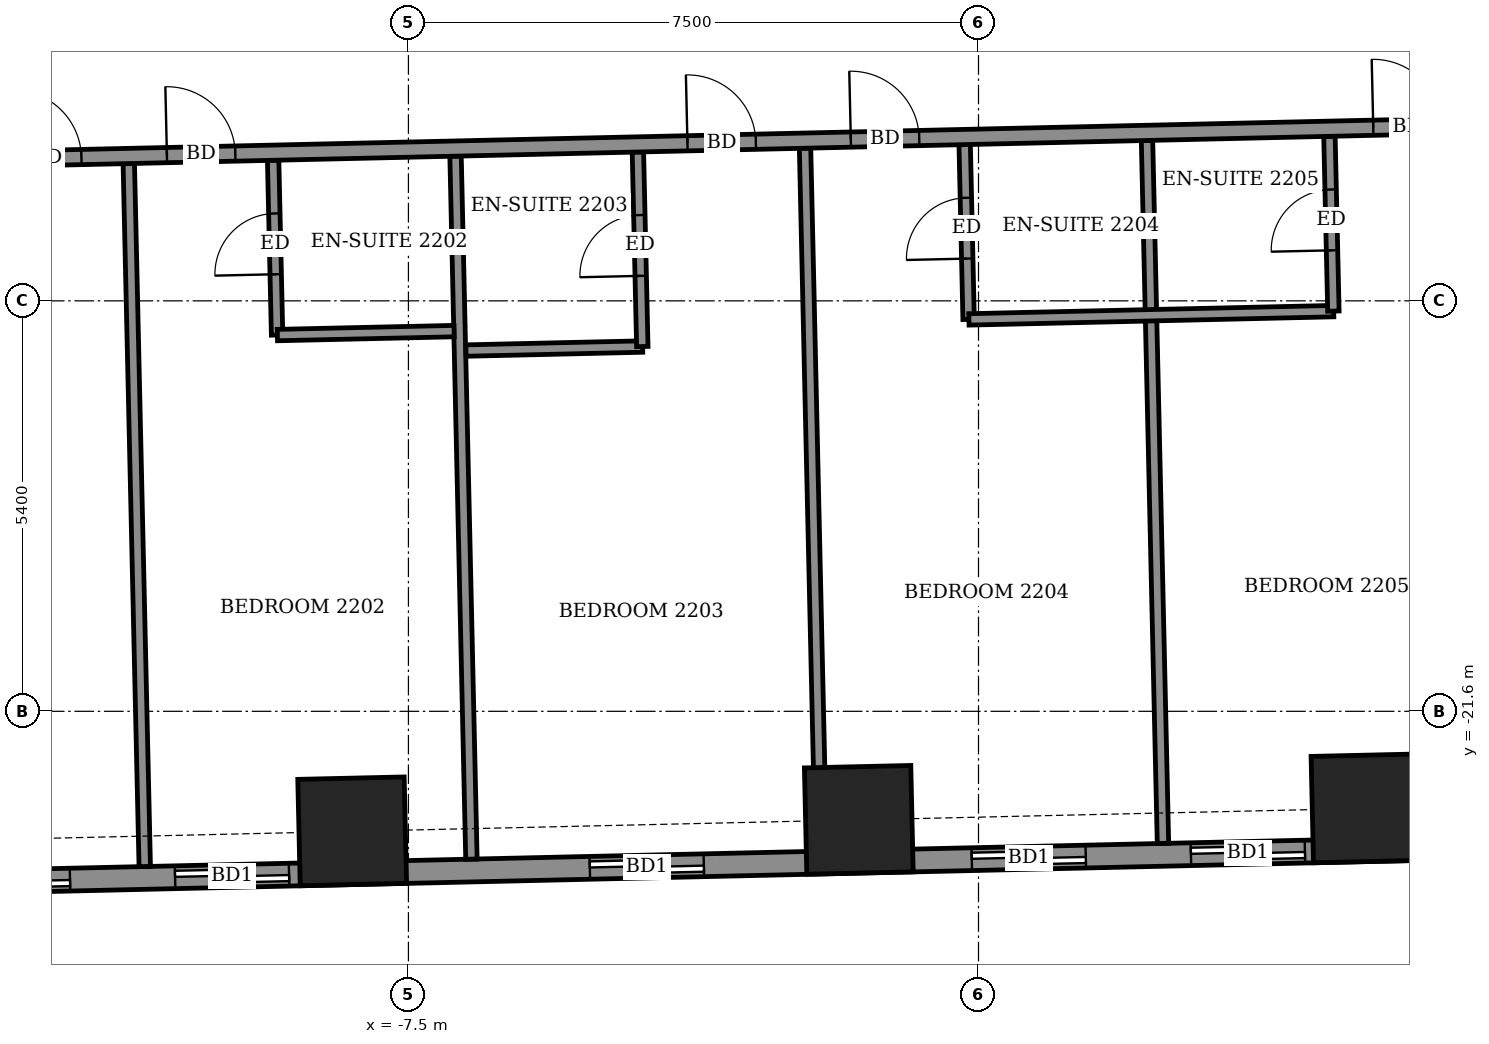
"""IFC4 building model, lengths in metres.
Left out: names, types, materials, properties, quantities, classifications, styles, units other than length and angle.
Written with IfcOpenShell. Run it as: python <this file> out.ifc"""

import sys

from ifc_helpers import new_model, si_unit, direction, frame, frame_2d, origin, origin_2d, place, context, subcontext, project, spatial, rectangle, extrude, element, fill, save


model = new_model("IFC4")
c1 = context("Model", 3, precision=1e-05, world=origin(), true_north=direction((0.0, 1.0)))
c2 = subcontext(c1, "Body", "Model", "MODEL_VIEW")
j1 = project(units=[si_unit("LENGTHUNIT", "METRE"), si_unit("PLANEANGLEUNIT", "RADIAN")], contexts=[c1])
p1 = place(None, origin())
s1 = spatial("IfcSite", under=j1, at=p1, CompositionType="ELEMENT")
p2 = place(p1, origin())
s2 = spatial("IfcBuilding", under=s1, at=p2, CompositionType="ELEMENT")
p3 = place(p2, frame((0.0, 0.0, 90.1)))
s3 = spatial("IfcBuildingStorey", under=s2, at=p3, CompositionType="ELEMENT", Elevation=90.1)
for number, where, z_axis, x_axis in (
    (1, (-8.24, -23.179, -0.55), (0.0, 0.0, 1.0), (1.0, 0.023, 0.0)),
    (2, (-1.575, -23.028, -0.55), (0.0, 0.0, 1.0), (1.0, 0.023, 0.0)),
    (3, (5.091, -22.877, -0.55), (0.0, 0.0, 1.0), (1.0, 0.023, 0.0)),
):
    element("IfcColumn", number, at=place(p3, frame(where, z_axis=z_axis, x_axis=x_axis)), inside=s3, PredefinedType="COLUMN", context=c2, shape_type="SweptSolid", body=[
        extrude(rectangle(XDim=1.4, YDim=1.4, at=origin_2d()), origin(), (0.0, 0.0, 1.0), 3.6),
    ])
p4 = place(p3, frame((-21.409, -24.029, 0.0), z_axis=(0.0, 0.0, 1.0), x_axis=(0.999742634032, 0.022686244721, 0.0)))
e4 = element("IfcWall", 4, at=p4, inside=s3, PredefinedType="SOLIDWALL", context=c2, shape_type="SweptSolid", body=[
    extrude(rectangle(XDim=46.372, YDim=0.3, at=frame_2d((23.186, 0.0))), origin(), (0.0, 0.0, 1.0), 3.05),
])
p5 = place(p4, frame((2.686, 0.0, 0.0)))
e5 = element("IfcOpeningElement", 5, at=p5, cuts=e4, PredefinedType="OPENING", context=c2, shape_type="SweptSolid", body=[
    extrude(rectangle(XDim=1.5, YDim=2.4, at=frame_2d((0.75, 1.2))), frame((0.0, 0.16, 0.0), z_axis=(0.0, -1.0, 0.0), x_axis=(1.0, 0.0, 0.0)), (0.0, 0.0, 1.0), 0.32),
])
p6 = place(p4, frame((7.959, 0.0, 0.0)))
e6 = element("IfcOpeningElement", 6, at=p6, cuts=e4, PredefinedType="OPENING", context=c2, shape_type="SweptSolid", body=[
    extrude(rectangle(XDim=1.5, YDim=2.4, at=frame_2d((0.75, 1.2))), frame((0.0, 0.16, 0.0), z_axis=(0.0, -1.0, 0.0), x_axis=(1.0, 0.0, 0.0)), (0.0, 0.0, 1.0), 0.32),
])
p7 = place(p4, frame((10.842, 0.0, 0.0)))
e7 = element("IfcOpeningElement", 7, at=p7, cuts=e4, PredefinedType="OPENING", context=c2, shape_type="SweptSolid", body=[
    extrude(rectangle(XDim=1.5, YDim=2.4, at=frame_2d((0.75, 1.2))), frame((0.0, 0.16, 0.0), z_axis=(0.0, -1.0, 0.0), x_axis=(1.0, 0.0, 0.0)), (0.0, 0.0, 1.0), 0.32),
])
p8 = place(p4, frame((16.3, 0.0, 0.0)))
e8 = element("IfcOpeningElement", 8, at=p8, cuts=e4, PredefinedType="OPENING", context=c2, shape_type="SweptSolid", body=[
    extrude(rectangle(XDim=1.5, YDim=2.4, at=frame_2d((0.75, 1.2))), frame((0.0, 0.16, 0.0), z_axis=(0.0, -1.0, 0.0), x_axis=(1.0, 0.0, 0.0)), (0.0, 0.0, 1.0), 0.32),
])
p9 = place(p4, frame((21.326, 0.0, 0.0)))
e9 = element("IfcOpeningElement", 9, at=p9, cuts=e4, PredefinedType="OPENING", context=c2, shape_type="SweptSolid", body=[
    extrude(rectangle(XDim=1.5, YDim=2.4, at=frame_2d((0.75, 1.2))), frame((0.0, 0.16, 0.0), z_axis=(0.0, -1.0, 0.0), x_axis=(1.0, 0.0, 0.0)), (0.0, 0.0, 1.0), 0.32),
])
p10 = place(p4, frame((24.21, 0.0, 0.0)))
e10 = element("IfcOpeningElement", 10, at=p10, cuts=e4, PredefinedType="OPENING", context=c2, shape_type="SweptSolid", body=[
    extrude(rectangle(XDim=1.5, YDim=2.4, at=frame_2d((0.75, 1.2))), frame((0.0, 0.16, 0.0), z_axis=(0.0, -1.0, 0.0), x_axis=(1.0, 0.0, 0.0)), (0.0, 0.0, 1.0), 0.32),
])
p11 = place(p4, frame((29.769, 0.0, 0.0)))
e11 = element("IfcOpeningElement", 11, at=p11, cuts=e4, PredefinedType="OPENING", context=c2, shape_type="SweptSolid", body=[
    extrude(rectangle(XDim=1.5, YDim=2.4, at=frame_2d((0.75, 1.2))), frame((0.0, 0.16, 0.0), z_axis=(0.0, -1.0, 0.0), x_axis=(1.0, 0.0, 0.0)), (0.0, 0.0, 1.0), 0.32),
])
p12 = place(p4, frame((34.819, 0.0, 0.0)))
e12 = element("IfcOpeningElement", 12, at=p12, cuts=e4, PredefinedType="OPENING", context=c2, shape_type="SweptSolid", body=[
    extrude(rectangle(XDim=1.5, YDim=2.4, at=frame_2d((0.75, 1.2))), frame((0.0, 0.16, 0.0), z_axis=(0.0, -1.0, 0.0), x_axis=(1.0, 0.0, 0.0)), (0.0, 0.0, 1.0), 0.32),
])
p13 = place(p4, frame((37.852, 0.0, 0.0)))
e13 = element("IfcOpeningElement", 13, at=p13, cuts=e4, PredefinedType="OPENING", context=c2, shape_type="SweptSolid", body=[
    extrude(rectangle(XDim=1.2, YDim=2.4, at=frame_2d((0.6, 1.2))), frame((0.0, 0.16, 0.0), z_axis=(0.0, -1.0, 0.0), x_axis=(1.0, 0.0, 0.0)), (0.0, 0.0, 1.0), 0.32),
])
p14 = place(p4, frame((42.373, 0.0, 0.9)))
e14 = element("IfcOpeningElement", 14, at=p14, cuts=e4, PredefinedType="OPENING", context=c2, shape_type="SweptSolid", body=[
    extrude(rectangle(XDim=2.4, YDim=1.5, at=frame_2d((1.2, 0.75))), frame((0.0, 0.16, 0.0), z_axis=(0.0, -1.0, 0.0), x_axis=(1.0, 0.0, 0.0)), (0.0, 0.0, 1.0), 0.32),
])
p15 = place(p3, frame((-10.969, -23.642, 0.0), z_axis=(0.0, 0.0, 1.0), x_axis=(-0.022697424684, 0.999742380272, 0.0)))
e15 = element("IfcWall", 15, at=p15, inside=s3, PredefinedType="PARTITIONING", context=c2, shape_type="SweptSolid", body=[
    extrude(rectangle(XDim=9.25, YDim=0.15, at=frame_2d((4.625, 0.0))), origin(), (0.0, 0.0, 1.0), 2.55),
])
p16 = place(p3, frame((-6.671, -23.545, 0.0), z_axis=(0.0, 0.0, 1.0), x_axis=(-0.022592505393, 0.999744756775, 0.0)))
e16 = element("IfcWall", 16, at=p16, inside=s3, PredefinedType="PARTITIONING", context=c2, shape_type="SweptSolid", body=[
    extrude(rectangle(XDim=9.25, YDim=0.15, at=frame_2d((4.625, 0.0))), origin(), (0.0, 0.0, 1.0), 2.55),
])
p17 = place(p3, frame((-2.072, -23.44, 0.0), z_axis=(0.0, 0.0, 1.0), x_axis=(-0.022697424684, 0.999742380272, 0.0)))
e17 = element("IfcWall", 17, at=p17, inside=s3, PredefinedType="PARTITIONING", context=c2, shape_type="SweptSolid", body=[
    extrude(rectangle(XDim=9.25, YDim=0.15, at=frame_2d((4.625, 0.0))), origin(), (0.0, 0.0, 1.0), 3.05),
])
p18 = place(p3, frame((2.427, -23.338, 0.0), z_axis=(0.0, 0.0, 1.0), x_axis=(-0.022698023584, 0.999742366675, 0.0)))
e18 = element("IfcWall", 18, at=p18, inside=s3, PredefinedType="PARTITIONING", context=c2, shape_type="SweptSolid", body=[
    extrude(rectangle(XDim=9.25, YDim=0.15, at=frame_2d((4.625, 0.0))), origin(), (0.0, 0.0, 1.0), 2.55),
])
p19 = place(p3, frame((-6.743, -16.854, 0.0), z_axis=(0.0, 0.0, 1.0), x_axis=(0.999740260747, 0.02279059109, 0.0)))
e19 = element("IfcWall", 19, at=p19, inside=s3, PredefinedType="PARTITIONING", context=c2, shape_type="SweptSolid", body=[
    extrude(rectangle(XDim=2.324, YDim=0.15, at=frame_2d((1.162, 0.0))), origin(), (0.0, 0.0, 1.0), 3.05),
])
p20 = place(p3, frame((-4.423, -16.801, 0.0), z_axis=(0.0, 0.0, 1.0), x_axis=(-0.022604411713, 0.999744487642, 0.0)))
e20 = element("IfcWall", 20, at=p20, inside=s3, PredefinedType="PARTITIONING", context=c2, shape_type="SweptSolid", body=[
    extrude(rectangle(XDim=2.56, YDim=0.15, at=frame_2d((1.28, 0.0))), origin(), (0.0, 0.0, 1.0), 3.05),
])
p21 = place(p20, frame((0.93, 0.0, 0.0)))
e21 = element("IfcOpeningElement", 21, at=p21, cuts=e20, PredefinedType="OPENING", context=c2, shape_type="SweptSolid", body=[
    extrude(rectangle(XDim=0.8, YDim=2.1, at=frame_2d((0.4, 1.05))), frame((0.0, 0.085, 0.0), z_axis=(0.0, -1.0, 0.0), x_axis=(1.0, 0.0, 0.0)), (0.0, 0.0, 1.0), 0.17),
])
p22 = place(p3, frame((-9.228, -16.65, 0.0), z_axis=(0.0, 0.0, 1.0), x_axis=(-0.022615284993, 0.999744241736, 0.0)))
e22 = element("IfcWall", 22, at=p22, inside=s3, PredefinedType="PARTITIONING", context=c2, shape_type="SweptSolid", body=[
    extrude(rectangle(XDim=2.299, YDim=0.15, at=frame_2d((1.15, 0.0))), origin(), (0.0, 0.0, 1.0), 3.05),
])
p23 = place(p22, frame((0.8, 0.0, 0.0)))
e23 = element("IfcOpeningElement", 23, at=p23, cuts=e22, PredefinedType="OPENING", context=c2, shape_type="SweptSolid", body=[
    extrude(rectangle(XDim=0.8, YDim=2.1, at=frame_2d((0.4, 1.05))), frame((0.0, 0.085, 0.0), z_axis=(0.0, -1.0, 0.0), x_axis=(1.0, 0.0, 0.0)), (0.0, 0.0, 1.0), 0.17),
])
p24 = place(p3, frame((-9.224, -16.65, 0.0), z_axis=(0.0, 0.0, 1.0), x_axis=(0.999750007167, 0.022358961731, 0.0)))
e24 = element("IfcWall", 24, at=p24, inside=s3, PredefinedType="PARTITIONING", context=c2, shape_type="SweptSolid", body=[
    extrude(rectangle(XDim=2.326, YDim=0.15, at=frame_2d((1.163, 0.0))), origin(), (0.0, 0.0, 1.0), 3.05),
])
p25 = place(p3, frame((-0.13, -16.444, 0.0), z_axis=(0.0, 0.0, 1.0), x_axis=(-0.022603288534, 0.999744513037, 0.0)))
e25 = element("IfcWall", 25, at=p25, inside=s3, PredefinedType="PARTITIONING", context=c2, shape_type="SweptSolid", body=[
    extrude(rectangle(XDim=2.301, YDim=0.15, at=frame_2d((1.15, 0.0))), origin(), (0.0, 0.0, 1.0), 3.05),
])
p26 = place(p25, frame((0.8, 0.0, 0.0)))
e26 = element("IfcOpeningElement", 26, at=p26, cuts=e25, PredefinedType="OPENING", context=c2, shape_type="SweptSolid", body=[
    extrude(rectangle(XDim=0.8, YDim=2.1, at=frame_2d((0.4, 1.05))), frame((0.0, 0.085, 0.0), z_axis=(0.0, -1.0, 0.0), x_axis=(1.0, 0.0, 0.0)), (0.0, 0.0, 1.0), 0.17),
])
p27 = place(p3, frame((-0.126, -16.444, 0.0), z_axis=(0.0, 0.0, 1.0), x_axis=(0.99974154664, 0.022734113616, 0.0)))
e27 = element("IfcWall", 27, at=p27, inside=s3, PredefinedType="PARTITIONING", context=c2, shape_type="SweptSolid", body=[
    extrude(rectangle(XDim=4.8, YDim=0.15, at=frame_2d((2.4, 0.0))), origin(), (0.0, 0.0, 1.0), 3.05),
])
p28 = place(p3, frame((4.669, -16.335, 0.0), z_axis=(0.0, 0.0, 1.0), x_axis=(-0.022612884682, 0.999744296031, 0.0)))
e28 = element("IfcWall", 28, at=p28, inside=s3, PredefinedType="PARTITIONING", context=c2, shape_type="SweptSolid", body=[
    extrude(rectangle(XDim=2.3, YDim=0.15, at=frame_2d((1.15, 0.0))), origin(), (0.0, 0.0, 1.0), 3.05),
])
p29 = place(p28, frame((0.8, 0.0, 0.0)))
e29 = element("IfcOpeningElement", 29, at=p29, cuts=e28, PredefinedType="OPENING", context=c2, shape_type="SweptSolid", body=[
    extrude(rectangle(XDim=0.8, YDim=2.1, at=frame_2d((0.4, 1.05))), frame((0.0, 0.085, 0.0), z_axis=(0.0, -1.0, 0.0), x_axis=(1.0, 0.0, 0.0)), (0.0, 0.0, 1.0), 0.17),
])
p30 = place(p3, frame((-24.274, -14.591, 0.0), z_axis=(0.0, 0.0, 1.0), x_axis=(0.999742718753, 0.022682510909, 0.0)))
e30 = element("IfcWall", 30, at=p30, inside=s3, PredefinedType="PARTITIONING", context=c2, shape_type="SweptSolid", body=[
    extrude(rectangle(XDim=52.471, YDim=0.2, at=frame_2d((26.236, 0.0))), origin(), (0.0, 0.0, 1.0), 3.05),
])
p31 = place(p30, frame((1.525, 0.0, 0.0)))
e31 = element("IfcOpeningElement", 31, at=p31, cuts=e30, PredefinedType="OPENING", context=c2, shape_type="SweptSolid", body=[
    extrude(rectangle(XDim=1.0, YDim=2.1, at=frame_2d((0.5, 1.05))), frame((0.0, 0.11, 0.0), z_axis=(0.0, -1.0, 0.0), x_axis=(1.0, 0.0, 0.0)), (0.0, 0.0, 1.0), 0.22),
])
p32 = place(p30, frame((6.9, 0.0, 0.0)))
e32 = element("IfcOpeningElement", 32, at=p32, cuts=e30, PredefinedType="OPENING", context=c2, shape_type="SweptSolid", body=[
    extrude(rectangle(XDim=0.9, YDim=2.1, at=frame_2d((0.45, 1.05))), frame((0.0, 0.11, 0.0), z_axis=(0.0, -1.0, 0.0), x_axis=(1.0, 0.0, 0.0)), (0.0, 0.0, 1.0), 0.22),
])
p33 = place(p30, frame((11.575, 0.0, 0.0)))
e33 = element("IfcOpeningElement", 33, at=p33, cuts=e30, PredefinedType="OPENING", context=c2, shape_type="SweptSolid", body=[
    extrude(rectangle(XDim=0.9, YDim=2.1, at=frame_2d((0.45, 1.05))), frame((0.0, 0.11, 0.0), z_axis=(0.0, -1.0, 0.0), x_axis=(1.0, 0.0, 0.0)), (0.0, 0.0, 1.0), 0.22),
])
p34 = place(p30, frame((13.6, 0.0, 0.0)))
e34 = element("IfcOpeningElement", 34, at=p34, cuts=e30, PredefinedType="OPENING", context=c2, shape_type="SweptSolid", body=[
    extrude(rectangle(XDim=0.9, YDim=2.1, at=frame_2d((0.45, 1.05))), frame((0.0, 0.11, 0.0), z_axis=(0.0, -1.0, 0.0), x_axis=(1.0, 0.0, 0.0)), (0.0, 0.0, 1.0), 0.22),
])
p35 = place(p30, frame((20.45, 0.0, 0.0)))
e35 = element("IfcOpeningElement", 35, at=p35, cuts=e30, PredefinedType="OPENING", context=c2, shape_type="SweptSolid", body=[
    extrude(rectangle(XDim=0.9, YDim=2.1, at=frame_2d((0.45, 1.05))), frame((0.0, 0.11, 0.0), z_axis=(0.0, -1.0, 0.0), x_axis=(1.0, 0.0, 0.0)), (0.0, 0.0, 1.0), 0.22),
])
p36 = place(p30, frame((22.6, 0.0, 0.0)))
e36 = element("IfcOpeningElement", 36, at=p36, cuts=e30, PredefinedType="OPENING", context=c2, shape_type="SweptSolid", body=[
    extrude(rectangle(XDim=0.9, YDim=2.1, at=frame_2d((0.45, 1.05))), frame((0.0, 0.11, 0.0), z_axis=(0.0, -1.0, 0.0), x_axis=(1.0, 0.0, 0.0)), (0.0, 0.0, 1.0), 0.22),
])
p37 = place(p30, frame((29.475, 0.0, 0.0)))
e37 = element("IfcOpeningElement", 37, at=p37, cuts=e30, PredefinedType="OPENING", context=c2, shape_type="SweptSolid", body=[
    extrude(rectangle(XDim=0.9, YDim=2.1, at=frame_2d((0.45, 1.05))), frame((0.0, 0.11, 0.0), z_axis=(0.0, -1.0, 0.0), x_axis=(1.0, 0.0, 0.0)), (0.0, 0.0, 1.0), 0.22),
])
p38 = place(p30, frame((31.675, 0.0, 0.0)))
e38 = element("IfcOpeningElement", 38, at=p38, cuts=e30, PredefinedType="OPENING", context=c2, shape_type="SweptSolid", body=[
    extrude(rectangle(XDim=0.9, YDim=2.1, at=frame_2d((0.45, 1.05))), frame((0.0, 0.11, 0.0), z_axis=(0.0, -1.0, 0.0), x_axis=(1.0, 0.0, 0.0)), (0.0, 0.0, 1.0), 0.22),
])
p39 = place(p30, frame((38.675, 0.0, 0.0)))
e39 = element("IfcOpeningElement", 39, at=p39, cuts=e30, PredefinedType="OPENING", context=c2, shape_type="SweptSolid", body=[
    extrude(rectangle(XDim=0.9, YDim=2.1, at=frame_2d((0.45, 1.05))), frame((0.0, 0.11, 0.0), z_axis=(0.0, -1.0, 0.0), x_axis=(1.0, 0.0, 0.0)), (0.0, 0.0, 1.0), 0.22),
])
p40 = place(p30, frame((40.675, 0.0, 0.0)))
e40 = element("IfcOpeningElement", 40, at=p40, cuts=e30, PredefinedType="OPENING", context=c2, shape_type="SweptSolid", body=[
    extrude(rectangle(XDim=0.9, YDim=2.1, at=frame_2d((0.45, 1.05))), frame((0.0, 0.11, 0.0), z_axis=(0.0, -1.0, 0.0), x_axis=(1.0, 0.0, 0.0)), (0.0, 0.0, 1.0), 0.22),
])
p41 = place(p30, frame((50.436, 0.0, 0.0)))
e41 = element("IfcOpeningElement", 41, at=p41, cuts=e30, PredefinedType="OPENING", context=c2, shape_type="SweptSolid", body=[
    extrude(rectangle(XDim=1.0, YDim=2.1, at=frame_2d((0.5, 1.05))), frame((0.0, 0.11, 0.0), z_axis=(0.0, -1.0, 0.0), x_axis=(1.0, 0.0, 0.0)), (0.0, 0.0, 1.0), 0.22),
])
p42 = place(p30, frame((45.45, 0.0, 0.0)))
e42 = element("IfcOpeningElement", 42, at=p42, cuts=e30, PredefinedType="OPENING", context=c2, shape_type="SweptSolid", body=[
    extrude(rectangle(XDim=0.9, YDim=2.1, at=frame_2d((0.45, 1.05))), frame((0.0, 0.11, 0.0), z_axis=(0.0, -1.0, 0.0), x_axis=(1.0, 0.0, 0.0)), (0.0, 0.0, 1.0), 0.22),
])
p43 = place(p6, origin())
e43 = element("IfcDoor", 43, at=p43, inside=s3, OperationType="SLIDING_TO_LEFT", PredefinedType="DOOR", context=c2, shape_type="SweptSolid", body=[
    extrude(rectangle(XDim=1.5, YDim=2.4, at=frame_2d((0.75, 1.2))), frame((0.0, 0.025, 0.0), z_axis=(0.0, -1.0, 0.0), x_axis=(1.0, 0.0, 0.0)), (0.0, 0.0, 1.0), 0.05),
])
fill(e6, e43)
p44 = place(p7, origin())
e44 = element("IfcDoor", 44, at=p44, inside=s3, OperationType="SLIDING_TO_LEFT", PredefinedType="DOOR", context=c2, shape_type="SweptSolid", body=[
    extrude(rectangle(XDim=1.5, YDim=2.4, at=frame_2d((0.75, 1.2))), frame((0.0, 0.025, 0.0), z_axis=(0.0, -1.0, 0.0), x_axis=(1.0, 0.0, 0.0)), (0.0, 0.0, 1.0), 0.05),
])
fill(e7, e44)
p45 = place(p8, origin())
e45 = element("IfcDoor", 45, at=p45, inside=s3, OperationType="SLIDING_TO_LEFT", PredefinedType="DOOR", context=c2, shape_type="SweptSolid", body=[
    extrude(rectangle(XDim=1.5, YDim=2.4, at=frame_2d((0.75, 1.2))), frame((0.0, 0.025, 0.0), z_axis=(0.0, -1.0, 0.0), x_axis=(1.0, 0.0, 0.0)), (0.0, 0.0, 1.0), 0.05),
])
fill(e8, e45)
p46 = place(p9, origin())
e46 = element("IfcDoor", 46, at=p46, inside=s3, OperationType="SLIDING_TO_LEFT", PredefinedType="DOOR", context=c2, shape_type="SweptSolid", body=[
    extrude(rectangle(XDim=1.5, YDim=2.4, at=frame_2d((0.75, 1.2))), frame((0.0, 0.025, 0.0), z_axis=(0.0, -1.0, 0.0), x_axis=(1.0, 0.0, 0.0)), (0.0, 0.0, 1.0), 0.05),
])
fill(e9, e46)
p47 = place(p10, origin())
e47 = element("IfcDoor", 47, at=p47, inside=s3, OperationType="SLIDING_TO_LEFT", PredefinedType="DOOR", context=c2, shape_type="SweptSolid", body=[
    extrude(rectangle(XDim=1.5, YDim=2.4, at=frame_2d((0.75, 1.2))), frame((0.0, 0.025, 0.0), z_axis=(0.0, -1.0, 0.0), x_axis=(1.0, 0.0, 0.0)), (0.0, 0.0, 1.0), 0.05),
])
fill(e10, e47)
p48 = place(p33, origin())
e48 = element("IfcDoor", 48, at=p48, inside=s3, OperationType="SINGLE_SWING_LEFT", PredefinedType="DOOR", context=c2, shape_type="SweptSolid", body=[
    extrude(rectangle(XDim=0.9, YDim=2.1, at=frame_2d((0.45, 1.05))), frame((0.0, 0.025, 0.0), z_axis=(0.0, -1.0, 0.0), x_axis=(1.0, 0.0, 0.0)), (0.0, 0.0, 1.0), 0.05),
])
fill(e33, e48)
p49 = place(p34, origin())
e49 = element("IfcDoor", 49, at=p49, inside=s3, OperationType="SINGLE_SWING_RIGHT", PredefinedType="DOOR", context=c2, shape_type="SweptSolid", body=[
    extrude(rectangle(XDim=0.9, YDim=2.1, at=frame_2d((0.45, 1.05))), frame((0.0, 0.025, 0.0), z_axis=(0.0, -1.0, 0.0), x_axis=(1.0, 0.0, 0.0)), (0.0, 0.0, 1.0), 0.05),
])
fill(e34, e49)
p50 = place(p23, origin())
e50 = element("IfcDoor", 50, at=p50, inside=s3, OperationType="SINGLE_SWING_RIGHT", PredefinedType="DOOR", context=c2, shape_type="SweptSolid", body=[
    extrude(rectangle(XDim=0.8, YDim=2.1, at=frame_2d((0.4, 1.05))), frame((0.0, 0.025, 0.0), z_axis=(0.0, -1.0, 0.0), x_axis=(1.0, 0.0, 0.0)), (0.0, 0.0, 1.0), 0.05),
])
fill(e23, e50)
p51 = place(p35, origin())
e51 = element("IfcDoor", 51, at=p51, inside=s3, OperationType="SINGLE_SWING_LEFT", PredefinedType="DOOR", context=c2, shape_type="SweptSolid", body=[
    extrude(rectangle(XDim=0.9, YDim=2.1, at=frame_2d((0.45, 1.05))), frame((0.0, 0.025, 0.0), z_axis=(0.0, -1.0, 0.0), x_axis=(1.0, 0.0, 0.0)), (0.0, 0.0, 1.0), 0.05),
])
fill(e35, e51)
p52 = place(p21, origin())
e52 = element("IfcDoor", 52, at=p52, inside=s3, OperationType="SINGLE_SWING_LEFT", PredefinedType="DOOR", context=c2, shape_type="SweptSolid", body=[
    extrude(rectangle(XDim=0.8, YDim=2.1, at=frame_2d((0.4, 1.05))), frame((0.0, 0.025, 0.0), z_axis=(0.0, -1.0, 0.0), x_axis=(1.0, 0.0, 0.0)), (0.0, 0.0, 1.0), 0.05),
])
fill(e21, e52)
p53 = place(p36, origin())
e53 = element("IfcDoor", 53, at=p53, inside=s3, OperationType="SINGLE_SWING_RIGHT", PredefinedType="DOOR", context=c2, shape_type="SweptSolid", body=[
    extrude(rectangle(XDim=0.9, YDim=2.1, at=frame_2d((0.45, 1.05))), frame((0.0, 0.025, 0.0), z_axis=(0.0, -1.0, 0.0), x_axis=(1.0, 0.0, 0.0)), (0.0, 0.0, 1.0), 0.05),
])
fill(e36, e53)
p54 = place(p26, origin())
e54 = element("IfcDoor", 54, at=p54, inside=s3, OperationType="SINGLE_SWING_RIGHT", PredefinedType="DOOR", context=c2, shape_type="SweptSolid", body=[
    extrude(rectangle(XDim=0.8, YDim=2.1, at=frame_2d((0.4, 1.05))), frame((0.0, 0.025, 0.0), z_axis=(0.0, -1.0, 0.0), x_axis=(1.0, 0.0, 0.0)), (0.0, 0.0, 1.0), 0.05),
])
fill(e26, e54)
p55 = place(p37, origin())
e55 = element("IfcDoor", 55, at=p55, inside=s3, OperationType="SINGLE_SWING_LEFT", PredefinedType="DOOR", context=c2, shape_type="SweptSolid", body=[
    extrude(rectangle(XDim=0.9, YDim=2.1, at=frame_2d((0.45, 1.05))), frame((0.0, 0.025, 0.0), z_axis=(0.0, -1.0, 0.0), x_axis=(1.0, 0.0, 0.0)), (0.0, 0.0, 1.0), 0.05),
])
fill(e37, e55)
p56 = place(p29, origin())
e56 = element("IfcDoor", 56, at=p56, inside=s3, OperationType="SINGLE_SWING_LEFT", PredefinedType="DOOR", context=c2, shape_type="SweptSolid", body=[
    extrude(rectangle(XDim=0.8, YDim=2.1, at=frame_2d((0.4, 1.05))), frame((0.0, 0.025, 0.0), z_axis=(0.0, -1.0, 0.0), x_axis=(1.0, 0.0, 0.0)), (0.0, 0.0, 1.0), 0.05),
])
fill(e29, e56)
save(model, sys.argv[1])
